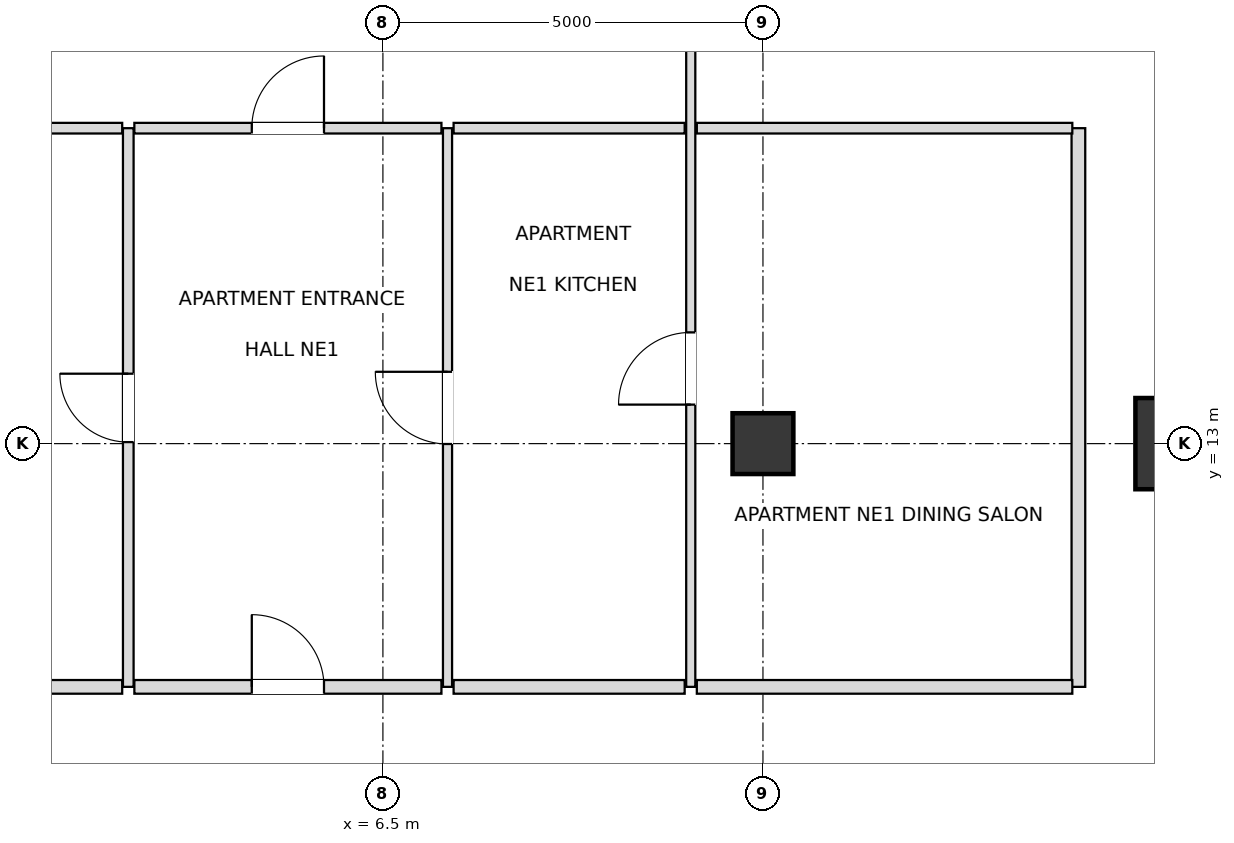
"""IFC4 building model, lengths in metres.
Left out: names, types, materials, properties, quantities, classifications, styles, units other than length and angle.
Written with IfcOpenShell. Run it as: python <this file> out.ifc"""

import sys

from ifc_helpers import new_model, si_unit, direction, frame, frame_2d, origin, origin_2d, place, context, subcontext, project, spatial, rectangle, extrude, element, fill, save


model = new_model("IFC4")
c1 = context("Model", 3, precision=1e-05, world=origin(), true_north=direction((0.0, 1.0)))
c2 = subcontext(c1, "Body", "Model", "MODEL_VIEW")
j1 = project(units=[si_unit("LENGTHUNIT", "METRE"), si_unit("PLANEANGLEUNIT", "RADIAN")], contexts=[c1])
p1 = place(None, origin())
s1 = spatial("IfcSite", under=j1, at=p1, CompositionType="ELEMENT")
p2 = place(p1, origin())
s2 = spatial("IfcBuilding", under=s1, at=p2, CompositionType="ELEMENT")
p3 = place(p2, frame((0.0, 0.0, 147.6)))
s3 = spatial("IfcBuildingStorey", under=s2, at=p3, CompositionType="ELEMENT", Elevation=147.6)
p4 = place(p3, frame((17.0, 13.0, 0.0), z_axis=(0.0, 0.0, 1.0), x_axis=(1.0, 0.0, 0.0)))
e1 = element("IfcColumn", 1, at=p4, inside=s3, PredefinedType="USERDEFINED", context=c2, shape_type="SweptSolid", body=[
    extrude(rectangle(XDim=1.2, YDim=1.2, at=origin_2d()), origin(), (0.0, 0.0, 1.0), 3.6),
])
p5 = place(p3, frame((11.5, 13.0, 0.0), z_axis=(0.0, 0.0, 1.0), x_axis=(1.0, 0.0, 0.0)))
e2 = element("IfcColumn", 2, at=p5, inside=s3, PredefinedType="COLUMN", context=c2, shape_type="SweptSolid", body=[
    extrude(rectangle(XDim=0.8, YDim=0.8, at=origin_2d()), origin(), (0.0, 0.0, 1.0), 3.6),
])
p6 = place(p3, frame((3.15, 9.8, 0.0), z_axis=(0.0, 0.0, 1.0), x_axis=(0.0, 1.0, 0.0)))
e3 = element("IfcWall", 3, at=p6, inside=s3, PredefinedType="PARTITIONING", context=c2, shape_type="SweptSolid", body=[
    extrude(rectangle(XDim=7.35, YDim=0.14, at=frame_2d((3.675, 0.0))), origin(), (0.0, 0.0, 1.0), 3.38),
])
p7 = place(p6, frame((3.22, 0.0, 0.0)))
e4 = element("IfcOpeningElement", 4, at=p7, cuts=e3, PredefinedType="OPENING", context=c2, shape_type="SweptSolid", body=[
    extrude(rectangle(XDim=0.9, YDim=2.1, at=frame_2d((0.45, 1.05))), frame((0.0, 0.08, 0.0), z_axis=(0.0, -1.0, 0.0), x_axis=(1.0, 0.0, 0.0)), (0.0, 0.0, 1.0), 0.16),
])
p8 = place(p3, frame((7.35, 9.8, 0.0), z_axis=(0.0, 0.0, 1.0), x_axis=(0.0, 1.0, 0.0)))
e5 = element("IfcWall", 5, at=p8, inside=s3, PredefinedType="PARTITIONING", context=c2, shape_type="SweptSolid", body=[
    extrude(rectangle(XDim=7.35, YDim=0.12, at=frame_2d((3.675, 0.0))), origin(), (0.0, 0.0, 1.0), 2.816),
])
p9 = place(p8, frame((3.195, 0.0, 0.0)))
e6 = element("IfcOpeningElement", 6, at=p9, cuts=e5, PredefinedType="OPENING", context=c2, shape_type="SweptSolid", body=[
    extrude(rectangle(XDim=0.95, YDim=2.1, at=frame_2d((0.475, 1.05))), frame((0.0, 0.07, 0.0), z_axis=(0.0, -1.0, 0.0), x_axis=(1.0, 0.0, 0.0)), (0.0, 0.0, 1.0), 0.14),
])
p10 = place(p3, frame((10.55, 9.8, 0.0), z_axis=(0.0, 0.0, 1.0), x_axis=(0.0, 1.0, 0.0)))
e7 = element("IfcWall", 7, at=p10, inside=s3, PredefinedType="PARTITIONING", context=c2, shape_type="SweptSolid", body=[
    extrude(rectangle(XDim=13.35, YDim=0.12, at=frame_2d((6.675, 0.0))), origin(), (0.0, 0.0, 1.0), 2.816),
])
p11 = place(p10, frame((3.713, 0.0, 0.0)))
e8 = element("IfcOpeningElement", 8, at=p11, cuts=e7, PredefinedType="OPENING", context=c2, shape_type="SweptSolid", body=[
    extrude(rectangle(XDim=0.95, YDim=2.1, at=frame_2d((0.475, 1.05))), frame((0.0, 0.07, 0.0), z_axis=(0.0, -1.0, 0.0), x_axis=(1.0, 0.0, 0.0)), (0.0, 0.0, 1.0), 0.14),
])
p12 = place(p10, frame((11.051, 0.0, 0.0)))
e9 = element("IfcOpeningElement", 9, at=p12, cuts=e7, PredefinedType="OPENING", context=c2, shape_type="SweptSolid", body=[
    extrude(rectangle(XDim=0.9, YDim=2.1, at=frame_2d((0.45, 1.05))), frame((0.0, 0.07, 0.0), z_axis=(0.0, -1.0, 0.0), x_axis=(1.0, 0.0, 0.0)), (0.0, 0.0, 1.0), 0.14),
])
p13 = place(p3, frame((15.65, 9.8, 0.0), z_axis=(0.0, 0.0, 1.0), x_axis=(0.0, 1.0, 0.0)))
e10 = element("IfcWall", 10, at=p13, inside=s3, PredefinedType="PARTITIONING", context=c2, shape_type="SweptSolid", body=[
    extrude(rectangle(XDim=7.35, YDim=0.18, at=frame_2d((3.675, 0.0))), origin(), (0.0, 0.0, 1.0), 2.736),
])
p14 = place(p3, frame((1.28, 9.8, 0.0), z_axis=(0.0, 0.0, 1.0), x_axis=(1.0, 0.0, 0.0)))
e11 = element("IfcWall", 11, at=p14, inside=s3, PredefinedType="PARTITIONING", context=c2, shape_type="SweptSolid", body=[
    extrude(rectangle(XDim=1.79, YDim=0.18, at=frame_2d((0.895, 0.0))), origin(), (0.0, 0.0, 1.0), 3.38),
])
p15 = place(p3, frame((3.23, 9.8, 0.0), z_axis=(0.0, 0.0, 1.0), x_axis=(1.0, 0.0, 0.0)))
e12 = element("IfcWall", 12, at=p15, inside=s3, PredefinedType="PARTITIONING", context=c2, shape_type="SweptSolid", body=[
    extrude(rectangle(XDim=4.04, YDim=0.18, at=frame_2d((2.02, 0.0))), origin(), (0.0, 0.0, 1.0), 2.816),
])
p16 = place(p15, frame((1.545, 0.0, 0.0)))
e13 = element("IfcOpeningElement", 13, at=p16, cuts=e12, PredefinedType="OPENING", context=c2, shape_type="SweptSolid", body=[
    extrude(rectangle(XDim=0.95, YDim=2.15, at=frame_2d((0.475, 1.075))), frame((0.0, 0.1, 0.0), z_axis=(0.0, -1.0, 0.0), x_axis=(1.0, 0.0, 0.0)), (0.0, 0.0, 1.0), 0.2),
])
p17 = place(p3, frame((7.43, 9.8, 0.0), z_axis=(0.0, 0.0, 1.0), x_axis=(1.0, 0.0, 0.0)))
e14 = element("IfcWall", 14, at=p17, inside=s3, PredefinedType="PARTITIONING", context=c2, shape_type="SweptSolid", body=[
    extrude(rectangle(XDim=3.04, YDim=0.18, at=frame_2d((1.52, 0.0))), origin(), (0.0, 0.0, 1.0), 3.38),
])
p18 = place(p3, frame((10.63, 9.8, 0.0), z_axis=(0.0, 0.0, 1.0), x_axis=(1.0, 0.0, 0.0)))
e15 = element("IfcWall", 15, at=p18, inside=s3, PredefinedType="PARTITIONING", context=c2, shape_type="SweptSolid", body=[
    extrude(rectangle(XDim=4.94, YDim=0.18, at=frame_2d((2.47, 0.0))), origin(), (0.0, 0.0, 1.0), 3.38),
])
p19 = place(p3, frame((1.28, 17.15, 0.0), z_axis=(0.0, 0.0, 1.0), x_axis=(1.0, 0.0, 0.0)))
e16 = element("IfcWall", 16, at=p19, inside=s3, PredefinedType="PARTITIONING", context=c2, shape_type="SweptSolid", body=[
    extrude(rectangle(XDim=1.79, YDim=0.14, at=frame_2d((0.895, 0.0))), origin(), (0.0, 0.0, 1.0), 3.38),
])
p20 = place(p3, frame((3.23, 17.15, 0.0), z_axis=(0.0, 0.0, 1.0), x_axis=(1.0, 0.0, 0.0)))
e17 = element("IfcWall", 17, at=p20, inside=s3, PredefinedType="PARTITIONING", context=c2, shape_type="SweptSolid", body=[
    extrude(rectangle(XDim=4.04, YDim=0.14, at=frame_2d((2.02, 0.0))), origin(), (0.0, 0.0, 1.0), 2.816),
])
p21 = place(p20, frame((1.545, 0.0, 0.0)))
e18 = element("IfcOpeningElement", 18, at=p21, cuts=e17, PredefinedType="OPENING", context=c2, shape_type="SweptSolid", body=[
    extrude(rectangle(XDim=0.95, YDim=2.1, at=frame_2d((0.475, 1.05))), frame((0.0, 0.08, 0.0), z_axis=(0.0, -1.0, 0.0), x_axis=(1.0, 0.0, 0.0)), (0.0, 0.0, 1.0), 0.16),
])
p22 = place(p3, frame((7.43, 17.15, 0.0), z_axis=(0.0, 0.0, 1.0), x_axis=(1.0, 0.0, 0.0)))
e19 = element("IfcWall", 19, at=p22, inside=s3, PredefinedType="PARTITIONING", context=c2, shape_type="SweptSolid", body=[
    extrude(rectangle(XDim=3.04, YDim=0.14, at=frame_2d((1.52, 0.0))), origin(), (0.0, 0.0, 1.0), 3.38),
])
p23 = place(p3, frame((10.63, 17.15, 0.0), z_axis=(0.0, 0.0, 1.0), x_axis=(1.0, 0.0, 0.0)))
e20 = element("IfcWall", 20, at=p23, inside=s3, PredefinedType="PARTITIONING", context=c2, shape_type="SweptSolid", body=[
    extrude(rectangle(XDim=4.94, YDim=0.14, at=frame_2d((2.47, 0.0))), origin(), (0.0, 0.0, 1.0), 2.736),
])
p24 = place(p7, origin())
e21 = element("IfcDoor", 21, at=p24, inside=s3, OperationType="SINGLE_SWING_RIGHT", PredefinedType="DOOR", context=c2, shape_type="SweptSolid", body=[
    extrude(rectangle(XDim=0.9, YDim=2.1, at=frame_2d((0.45, 1.05))), frame((0.0, 0.025, 0.0), z_axis=(0.0, -1.0, 0.0), x_axis=(1.0, 0.0, 0.0)), (0.0, 0.0, 1.0), 0.05),
])
fill(e4, e21)
p25 = place(p16, origin())
e22 = element("IfcDoor", 22, at=p25, inside=s3, OperationType="SINGLE_SWING_LEFT", PredefinedType="DOOR", context=c2, shape_type="SweptSolid", body=[
    extrude(rectangle(XDim=0.95, YDim=2.15, at=frame_2d((0.475, 1.075))), frame((0.0, 0.025, 0.0), z_axis=(0.0, -1.0, 0.0), x_axis=(1.0, 0.0, 0.0)), (0.0, 0.0, 1.0), 0.05),
])
fill(e13, e22)
p26 = place(p9, origin())
e23 = element("IfcDoor", 23, at=p26, inside=s3, OperationType="SINGLE_SWING_RIGHT", PredefinedType="DOOR", context=c2, shape_type="SweptSolid", body=[
    extrude(rectangle(XDim=0.95, YDim=2.1, at=frame_2d((0.475, 1.05))), frame((0.0, 0.025, 0.0), z_axis=(0.0, -1.0, 0.0), x_axis=(1.0, 0.0, 0.0)), (0.0, 0.0, 1.0), 0.05),
])
fill(e6, e23)
p27 = place(p11, origin())
e24 = element("IfcDoor", 24, at=p27, inside=s3, OperationType="SINGLE_SWING_LEFT", PredefinedType="DOOR", context=c2, shape_type="SweptSolid", body=[
    extrude(rectangle(XDim=0.95, YDim=2.1, at=frame_2d((0.475, 1.05))), frame((0.0, 0.025, 0.0), z_axis=(0.0, -1.0, 0.0), x_axis=(1.0, 0.0, 0.0)), (0.0, 0.0, 1.0), 0.05),
])
fill(e8, e24)
p28 = place(p21, origin())
e25 = element("IfcDoor", 25, at=p28, inside=s3, OperationType="SINGLE_SWING_RIGHT", PredefinedType="DOOR", context=c2, shape_type="SweptSolid", body=[
    extrude(rectangle(XDim=0.95, YDim=2.1, at=frame_2d((0.475, 1.05))), frame((0.0, 0.025, 0.0), z_axis=(0.0, -1.0, 0.0), x_axis=(1.0, 0.0, 0.0)), (0.0, 0.0, 1.0), 0.05),
])
fill(e18, e25)
save(model, sys.argv[1])
